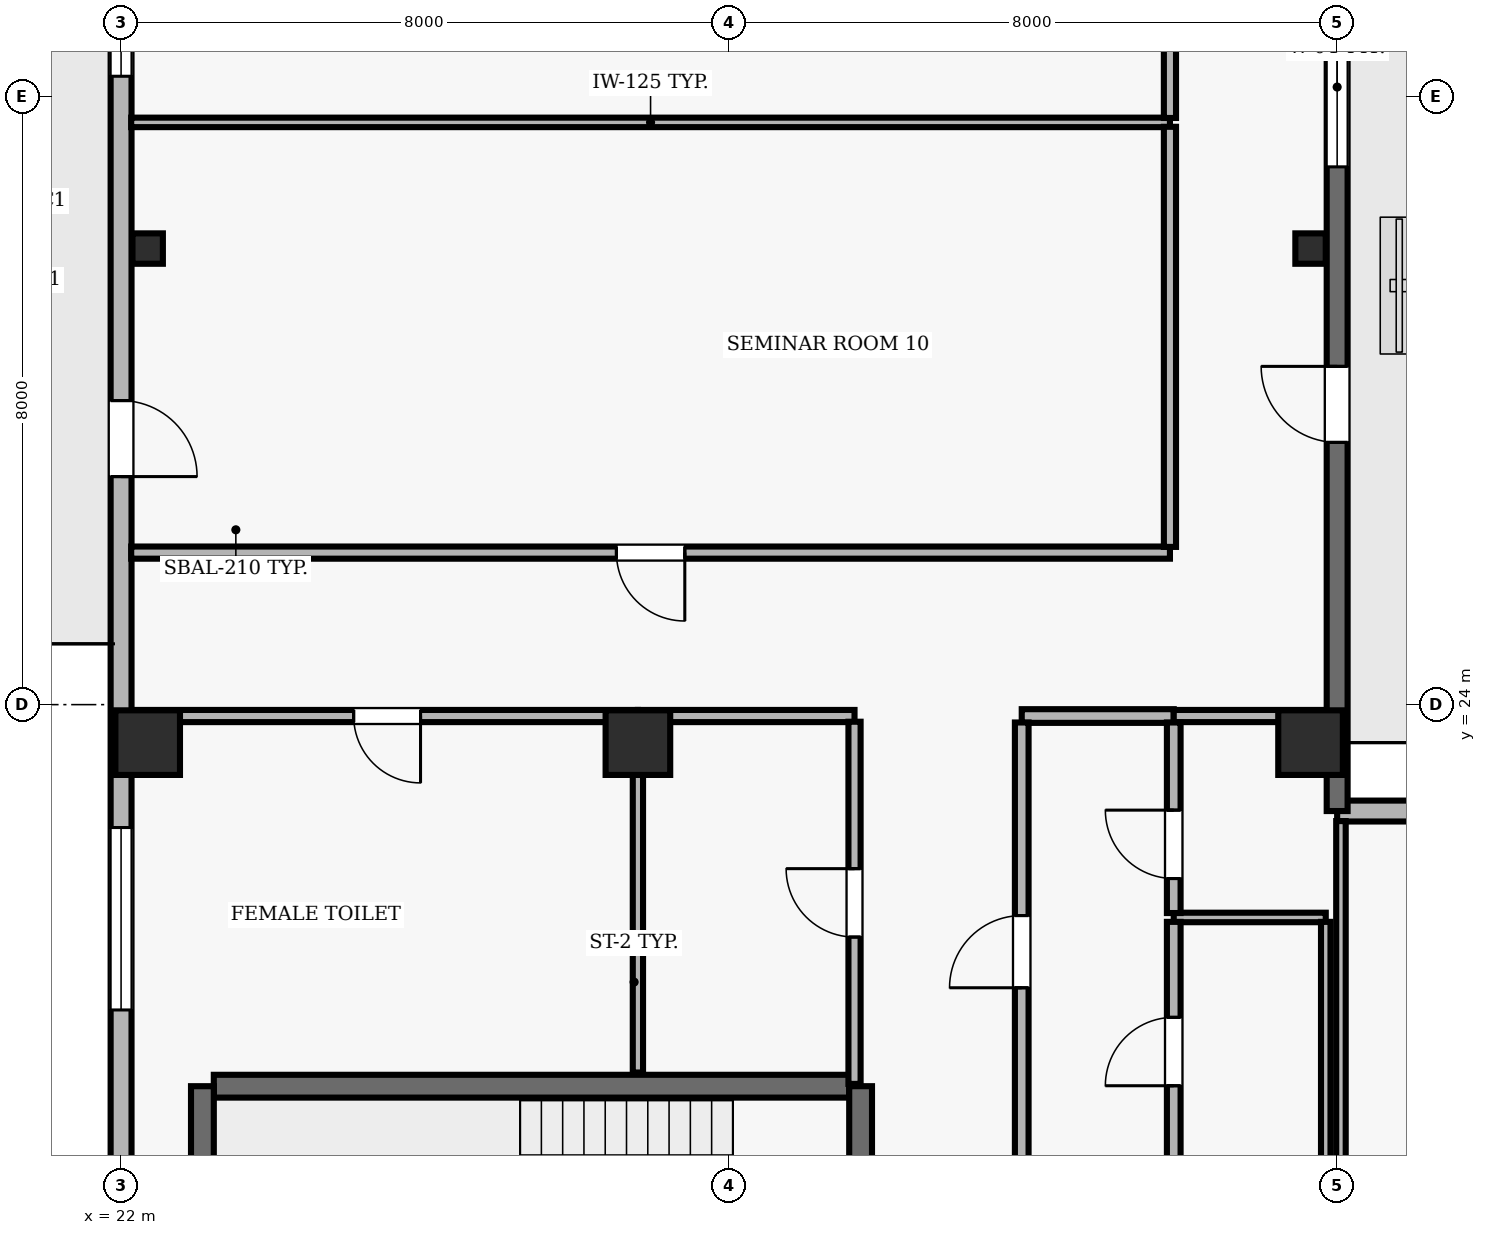
"""IFC4 building model, lengths in metres.
Left out: names, types, materials, properties, quantities, classifications, styles, units other than length and angle.
Written with IfcOpenShell. Run it as: python <this file> out.ifc"""

import sys

from ifc_helpers import new_model, si_unit, direction, frame, frame_2d, origin, origin_2d, place, context, subcontext, project, spatial, rectangle, hollow_rectangle, extrude, element, fill, save


model = new_model("IFC4")
c1 = context("Model", 3, precision=1e-05, world=origin(), true_north=direction((0.0, 1.0)))
c2 = subcontext(c1, "Body", "Model", "MODEL_VIEW")
j1 = project(units=[si_unit("LENGTHUNIT", "METRE"), si_unit("PLANEANGLEUNIT", "RADIAN")], contexts=[c1])
p1 = place(None, origin())
s1 = spatial("IfcSite", under=j1, at=p1, CompositionType="ELEMENT")
p2 = place(p1, origin())
s2 = spatial("IfcBuilding", under=s1, at=p2, CompositionType="ELEMENT")
p3 = place(p2, frame((0.0, 0.0, 275.5)))
s3 = spatial("IfcBuildingStorey", under=s2, at=p3, CompositionType="ELEMENT", Elevation=275.5)
for number, where, z_axis, x_axis in (
    (1, (22.35, 23.5, 0.0), (0.0, 0.0, 1.0), (1.0, 0.0, 0.0)),
    (2, (28.8, 23.5, 0.0), (0.0, 0.0, 1.0), (1.0, 0.0, 0.0)),
    (3, (37.65, 23.5, 0.0), (0.0, 0.0, 1.0), (1.0, 0.0, 0.0)),
):
    element("IfcColumn", number, at=place(p3, frame(where, z_axis=z_axis, x_axis=x_axis)), inside=s3, PredefinedType="COLUMN", context=c2, shape_type="SweptSolid", body=[
        extrude(rectangle(XDim=0.85, YDim=0.85, at=origin_2d()), origin(), (0.0, 0.0, 1.0), 3.9),
    ])
for number, where, z_axis, x_axis in (
    (4, (22.35, 30.0, 0.0), (0.0, 0.0, 1.0), (1.0, 0.0, 0.0)),
    (5, (37.65, 30.0, 0.0), (0.0, 0.0, 1.0), (1.0, 0.0, 0.0)),
):
    element("IfcColumn", number, at=place(p3, frame(where, z_axis=z_axis, x_axis=x_axis)), inside=s3, PredefinedType="COLUMN", context=c2, shape_type="SweptSolid", body=[
        extrude(hollow_rectangle(XDim=0.4, YDim=0.4, WallThickness=0.02, at=origin_2d()), origin(), (0.0, 0.0, 1.0), 3.9),
    ])
p4 = place(p3, frame((43.0, 22.6, 0.0), z_axis=(0.0, 0.0, 1.0), x_axis=(-1.0, 0.0, 0.0)))
e6 = element("IfcWall", 6, at=p4, inside=s3, PredefinedType="SOLIDWALL", context=c2, shape_type="SweptSolid", body=[
    extrude(rectangle(XDim=5.0, YDim=0.275, at=frame_2d((2.5, 0.0))), origin(), (0.0, 0.0, 1.0), 3.69),
])
p5 = place(p3, frame((38.0, 22.6, 0.0), z_axis=(0.0, 0.0, 1.0), x_axis=(0.0, 1.0, 0.0)))
e7 = element("IfcWall", 7, at=p5, inside=s3, PredefinedType="SOLIDWALL", context=c2, shape_type="SweptSolid", body=[
    extrude(rectangle(XDim=12.7, YDim=0.275, at=frame_2d((6.35, 0.0))), origin(), (0.0, 0.0, 1.0), 3.69),
])
p6 = place(p5, frame((4.85, 0.0, 0.0)))
e8 = element("IfcOpeningElement", 8, at=p6, cuts=e7, PredefinedType="OPENING", context=c2, shape_type="SweptSolid", body=[
    extrude(rectangle(XDim=1.0, YDim=2.2, at=frame_2d((0.5, 1.1))), frame((0.0, 0.147, 0.0), z_axis=(0.0, -1.0, 0.0), x_axis=(1.0, 0.0, 0.0)), (0.0, 0.0, 1.0), 0.295),
])
p7 = place(p5, frame((8.475, 0.0, 0.9)))
e9 = element("IfcOpeningElement", 9, at=p7, cuts=e7, PredefinedType="OPENING", context=c2, shape_type="SweptSolid", body=[
    extrude(rectangle(XDim=2.1, YDim=1.6, at=frame_2d((1.05, 0.8))), frame((0.0, 0.147, 0.0), z_axis=(0.0, -1.0, 0.0), x_axis=(1.0, 0.0, 0.0)), (0.0, 0.0, 1.0), 0.295),
])
p8 = place(p3, frame((22.0, 35.3, 0.0), z_axis=(0.0, 0.0, 1.0), x_axis=(0.0, -1.0, 0.0)))
e10 = element("IfcWall", 10, at=p8, inside=s3, PredefinedType="SOLIDWALL", context=c2, shape_type="SweptSolid", body=[
    extrude(rectangle(XDim=32.8, YDim=0.275, at=frame_2d((16.4, 0.0))), origin(), (0.0, 0.0, 1.0), 3.69),
])
p9 = place(p8, frame((7.3, 0.0, 0.0)))
e11 = element("IfcOpeningElement", 11, at=p9, cuts=e10, PredefinedType="OPENING", context=c2, shape_type="SweptSolid", body=[
    extrude(rectangle(XDim=1.0, YDim=2.2, at=frame_2d((0.5, 1.1))), frame((0.0, 0.147, 0.0), z_axis=(0.0, -1.0, 0.0), x_axis=(1.0, 0.0, 0.0)), (0.0, 0.0, 1.0), 0.295),
])
p10 = place(p8, frame((0.633, 0.0, 0.9)))
e12 = element("IfcOpeningElement", 12, at=p10, cuts=e10, PredefinedType="OPENING", context=c2, shape_type="SweptSolid", body=[
    extrude(rectangle(XDim=2.4, YDim=1.8, at=frame_2d((1.2, 0.9))), frame((0.0, 0.147, 0.0), z_axis=(0.0, -1.0, 0.0), x_axis=(1.0, 0.0, 0.0)), (0.0, 0.0, 1.0), 0.295),
])
p11 = place(p8, frame((12.917, 0.0, 0.9)))
e13 = element("IfcOpeningElement", 13, at=p11, cuts=e10, PredefinedType="OPENING", context=c2, shape_type="SweptSolid", body=[
    extrude(rectangle(XDim=2.4, YDim=1.8, at=frame_2d((1.2, 0.9))), frame((0.0, 0.147, 0.0), z_axis=(0.0, -1.0, 0.0), x_axis=(1.0, 0.0, 0.0)), (0.0, 0.0, 1.0), 0.295),
])
p12 = place(p8, frame((17.483, 0.0, 0.9)))
e14 = element("IfcOpeningElement", 14, at=p12, cuts=e10, PredefinedType="OPENING", context=c2, shape_type="SweptSolid", body=[
    extrude(rectangle(XDim=2.4, YDim=1.8, at=frame_2d((1.2, 0.9))), frame((0.0, 0.147, 0.0), z_axis=(0.0, -1.0, 0.0), x_axis=(1.0, 0.0, 0.0)), (0.0, 0.0, 1.0), 0.295),
])
p13 = place(p8, frame((23.4, 0.0, 0.9)))
e15 = element("IfcOpeningElement", 15, at=p13, cuts=e10, PredefinedType="OPENING", context=c2, shape_type="SweptSolid", body=[
    extrude(rectangle(XDim=2.4, YDim=1.8, at=frame_2d((1.2, 0.9))), frame((0.0, 0.147, 0.0), z_axis=(0.0, -1.0, 0.0), x_axis=(1.0, 0.0, 0.0)), (0.0, 0.0, 1.0), 0.295),
])
p14 = place(p3, frame((31.58, 18.98, 0.0), z_axis=(0.0, 0.0, 1.0), x_axis=(-1.0, 0.0, 0.0)))
e16 = element("IfcWall", 16, at=p14, inside=s3, PredefinedType="SHEAR", context=c2, shape_type="SweptSolid", body=[
    extrude(rectangle(XDim=8.36, YDim=0.3, at=frame_2d((4.18, 0.0))), origin(), (0.0, 0.0, 1.0), 3.69),
])
p15 = place(p3, frame((23.07, 18.98, 0.0), z_axis=(0.0, 0.0, 1.0), x_axis=(0.0, -1.0, 0.0)))
e17 = element("IfcWall", 17, at=p15, inside=s3, PredefinedType="SHEAR", context=c2, shape_type="SweptSolid", body=[
    extrude(rectangle(XDim=3.51, YDim=0.3, at=frame_2d((1.755, 0.0))), origin(), (0.0, 0.0, 1.0), 3.69),
])
p16 = place(p3, frame((31.73, 15.47, 0.0), z_axis=(0.0, 0.0, 1.0), x_axis=(0.0, 1.0, 0.0)))
e18 = element("IfcWall", 18, at=p16, inside=s3, PredefinedType="SHEAR", context=c2, shape_type="SweptSolid", body=[
    extrude(rectangle(XDim=3.51, YDim=0.3, at=frame_2d((1.755, 0.0))), origin(), (0.0, 0.0, 1.0), 3.69),
])
p17 = place(p16, frame((1.18, 0.0, 0.0)))
e19 = element("IfcOpeningElement", 19, at=p17, cuts=e18, PredefinedType="OPENING", context=c2, shape_type="SweptSolid", body=[
    extrude(rectangle(XDim=1.15, YDim=2.15, at=frame_2d((0.575, 1.075))), frame((0.0, 0.16, 0.0), z_axis=(0.0, -1.0, 0.0), x_axis=(1.0, 0.0, 0.0)), (0.0, 0.0, 1.0), 0.32),
])
p18 = place(p3, frame((28.8, 23.85, 0.0), z_axis=(0.0, 0.0, 1.0), x_axis=(-1.0, 0.0, 0.0)))
e20 = element("IfcWall", 20, at=p18, inside=s3, PredefinedType="PARTITIONING", context=c2, shape_type="SweptSolid", body=[
    extrude(rectangle(XDim=6.6, YDim=0.16, at=frame_2d((3.3, 0.0))), origin(), (0.0, 0.0, 1.0), 3.227),
])
p19 = place(p18, frame((2.86, 0.0, 0.0)))
e21 = element("IfcOpeningElement", 21, at=p19, cuts=e20, PredefinedType="OPENING", context=c2, shape_type="SweptSolid", body=[
    extrude(rectangle(XDim=0.88, YDim=2.1, at=frame_2d((0.44, 1.05))), frame((0.0, 0.09, 0.0), z_axis=(0.0, -1.0, 0.0), x_axis=(1.0, 0.0, 0.0)), (0.0, 0.0, 1.0), 0.18),
])
p20 = place(p3, frame((31.65, 23.85, 0.0), z_axis=(0.0, 0.0, 1.0), x_axis=(-1.0, 0.0, 0.0)))
e22 = element("IfcWall", 22, at=p20, inside=s3, PredefinedType="PARTITIONING", context=c2, shape_type="SweptSolid", body=[
    extrude(rectangle(XDim=2.85, YDim=0.16, at=frame_2d((1.425, 0.0))), origin(), (0.0, 0.0, 1.0), 3.227),
])
p21 = place(p3, frame((35.8, 26.0, 0.0), z_axis=(0.0, 0.0, 1.0), x_axis=(-1.0, 0.0, 0.0)))
e23 = element("IfcWall", 23, at=p21, inside=s3, PredefinedType="PARTITIONING", context=c2, shape_type="SweptSolid", body=[
    extrude(rectangle(XDim=13.667, YDim=0.16, at=frame_2d((6.833, 0.0))), origin(), (0.0, 0.0, 1.0), 3.69),
])
p22 = place(p21, frame((6.383, 0.0, 0.0)))
e24 = element("IfcOpeningElement", 24, at=p22, cuts=e23, PredefinedType="OPENING", context=c2, shape_type="SweptSolid", body=[
    extrude(rectangle(XDim=0.9, YDim=2.1, at=frame_2d((0.45, 1.05))), frame((0.0, 0.09, 0.0), z_axis=(0.0, -1.0, 0.0), x_axis=(1.0, 0.0, 0.0)), (0.0, 0.0, 1.0), 0.18),
])
p23 = place(p3, frame((35.8, 31.66, 0.0), z_axis=(0.0, 0.0, 1.0), x_axis=(-1.0, 0.0, 0.0)))
e25 = element("IfcWall", 25, at=p23, inside=s3, PredefinedType="PARTITIONING", context=c2, shape_type="SweptSolid", body=[
    extrude(rectangle(XDim=13.667, YDim=0.125, at=frame_2d((6.833, 0.0))), origin(), (0.0, 0.0, 1.0), 3.69),
])
p24 = place(p3, frame((35.85, 21.2, 0.0), z_axis=(0.0, 0.0, 1.0), x_axis=(1.0, 0.0, 0.0)))
e26 = element("IfcWall", 26, at=p24, inside=s3, PredefinedType="PARTITIONING", context=c2, shape_type="SweptSolid", body=[
    extrude(rectangle(XDim=2.0, YDim=0.125, at=frame_2d((1.0, 0.0))), origin(), (0.0, 0.0, 1.0), 3.69),
])
p25 = place(p3, frame((35.85, 23.85, 0.0), z_axis=(0.0, 0.0, 1.0), x_axis=(-1.0, 0.0, 0.0)))
e27 = element("IfcWall", 27, at=p25, inside=s3, PredefinedType="PARTITIONING", context=c2, shape_type="SweptSolid", body=[
    extrude(rectangle(XDim=2.0, YDim=0.18, at=frame_2d((1.0, 0.0))), origin(), (0.0, 0.0, 1.0), 3.227),
])
p26 = place(p3, frame((37.85, 23.85, 0.0), z_axis=(0.0, 0.0, 1.0), x_axis=(-1.0, 0.0, 0.0)))
e28 = element("IfcWall", 28, at=p26, inside=s3, PredefinedType="PARTITIONING", context=c2, shape_type="SweptSolid", body=[
    extrude(rectangle(XDim=2.0, YDim=0.16, at=frame_2d((1.0, 0.0))), origin(), (0.0, 0.0, 1.0), 3.227),
])
p27 = place(p3, frame((28.8, 23.775, 0.0), z_axis=(0.0, 0.0, 1.0), x_axis=(0.0, -1.0, 0.0)))
e29 = element("IfcWall", 29, at=p27, inside=s3, PredefinedType="PARTITIONING", context=c2, shape_type="SweptSolid", body=[
    extrude(rectangle(XDim=4.615, YDim=0.135, at=frame_2d((2.308, 0.0))), origin(), (0.0, 0.0, 1.0), 3.69),
])
p28 = place(p3, frame((31.65, 19.01, 0.0), z_axis=(0.0, 0.0, 1.0), x_axis=(0.0, 1.0, 0.0)))
e30 = element("IfcWall", 30, at=p28, inside=s3, PredefinedType="PARTITIONING", context=c2, shape_type="SweptSolid", body=[
    extrude(rectangle(XDim=4.765, YDim=0.16, at=frame_2d((2.382, 0.0))), origin(), (0.0, 0.0, 1.0), 3.69),
])
p29 = place(p28, frame((1.932, 0.0, 0.0)))
e31 = element("IfcOpeningElement", 31, at=p29, cuts=e30, PredefinedType="OPENING", context=c2, shape_type="SweptSolid", body=[
    extrude(rectangle(XDim=0.9, YDim=2.1, at=frame_2d((0.45, 1.05))), frame((0.0, 0.09, 0.0), z_axis=(0.0, -1.0, 0.0), x_axis=(1.0, 0.0, 0.0)), (0.0, 0.0, 1.0), 0.18),
])
p30 = place(p3, frame((33.85, 17.735, 0.0), z_axis=(0.0, 0.0, 1.0), x_axis=(0.0, 1.0, 0.0)))
e32 = element("IfcWall", 32, at=p30, inside=s3, PredefinedType="PARTITIONING", context=c2, shape_type="SweptSolid", body=[
    extrude(rectangle(XDim=6.03, YDim=0.18, at=frame_2d((3.015, 0.0))), origin(), (0.0, 0.0, 1.0), 3.69),
])
p31 = place(p30, frame((2.54, 0.0, 0.0)))
e33 = element("IfcOpeningElement", 33, at=p31, cuts=e32, PredefinedType="OPENING", context=c2, shape_type="SweptSolid", body=[
    extrude(rectangle(XDim=0.95, YDim=2.1, at=frame_2d((0.475, 1.05))), frame((0.0, 0.1, 0.0), z_axis=(0.0, -1.0, 0.0), x_axis=(1.0, 0.0, 0.0)), (0.0, 0.0, 1.0), 0.2),
])
p32 = place(p3, frame((35.8, 31.602, 0.0), z_axis=(0.0, 0.0, 1.0), x_axis=(0.0, -1.0, 0.0)))
e34 = element("IfcWall", 34, at=p32, inside=s3, PredefinedType="PARTITIONING", context=c2, shape_type="SweptSolid", body=[
    extrude(rectangle(XDim=5.527, YDim=0.16, at=frame_2d((2.764, 0.0))), origin(), (0.0, 0.0, 1.0), 3.69),
])
p33 = place(p3, frame((35.8, 37.313, 0.0), z_axis=(0.0, 0.0, 1.0), x_axis=(0.0, -1.0, 0.0)))
e35 = element("IfcWall", 35, at=p33, inside=s3, PredefinedType="PARTITIONING", context=c2, shape_type="SweptSolid", body=[
    extrude(rectangle(XDim=5.595, YDim=0.16, at=frame_2d((2.797, 0.0))), origin(), (0.0, 0.0, 1.0), 3.69),
])
p34 = place(p33, frame((2.348, 0.0, 0.0)))
e36 = element("IfcOpeningElement", 36, at=p34, cuts=e35, PredefinedType="OPENING", context=c2, shape_type="SweptSolid", body=[
    extrude(rectangle(XDim=0.9, YDim=2.1, at=frame_2d((0.45, 1.05))), frame((0.0, 0.09, 0.0), z_axis=(0.0, -1.0, 0.0), x_axis=(1.0, 0.0, 0.0)), (0.0, 0.0, 1.0), 0.18),
])
p35 = place(p3, frame((35.85, 17.73, 0.0), z_axis=(0.0, 0.0, 1.0), x_axis=(0.0, 1.0, 0.0)))
e37 = element("IfcWall", 37, at=p35, inside=s3, PredefinedType="PARTITIONING", context=c2, shape_type="SweptSolid", body=[
    extrude(rectangle(XDim=3.412, YDim=0.18, at=frame_2d((1.706, 0.0))), origin(), (0.0, 0.0, 1.0), 3.69),
])
p36 = place(p35, frame((1.256, 0.0, 0.0)))
e38 = element("IfcOpeningElement", 38, at=p36, cuts=e37, PredefinedType="OPENING", context=c2, shape_type="SweptSolid", body=[
    extrude(rectangle(XDim=0.9, YDim=2.1, at=frame_2d((0.45, 1.05))), frame((0.0, 0.1, 0.0), z_axis=(0.0, -1.0, 0.0), x_axis=(1.0, 0.0, 0.0)), (0.0, 0.0, 1.0), 0.2),
])
p37 = place(p3, frame((35.85, 21.258, 0.0), z_axis=(0.0, 0.0, 1.0), x_axis=(0.0, 1.0, 0.0)))
e39 = element("IfcWall", 39, at=p37, inside=s3, PredefinedType="PARTITIONING", context=c2, shape_type="SweptSolid", body=[
    extrude(rectangle(XDim=2.507, YDim=0.18, at=frame_2d((1.253, 0.0))), origin(), (0.0, 0.0, 1.0), 3.69),
])
p38 = place(p37, frame((0.454, 0.0, 0.0)))
e40 = element("IfcOpeningElement", 40, at=p38, cuts=e39, PredefinedType="OPENING", context=c2, shape_type="SweptSolid", body=[
    extrude(rectangle(XDim=0.9, YDim=2.1, at=frame_2d((0.45, 1.05))), frame((0.0, 0.1, 0.0), z_axis=(0.0, -1.0, 0.0), x_axis=(1.0, 0.0, 0.0)), (0.0, 0.0, 1.0), 0.2),
])
p39 = place(p3, frame((37.85, 17.65, 0.0), z_axis=(0.0, 0.0, 1.0), x_axis=(0.0, 1.0, 0.0)))
e41 = element("IfcWall", 41, at=p39, inside=s3, PredefinedType="PARTITIONING", context=c2, shape_type="SweptSolid", body=[
    extrude(rectangle(XDim=3.492, YDim=0.125, at=frame_2d((1.746, 0.0))), origin(), (0.0, 0.0, 1.0), 3.227),
])
p40 = place(p3, frame((38.05, 22.468, 0.0), z_axis=(0.0, 0.0, 1.0), x_axis=(0.0, -1.0, 0.0)))
e42 = element("IfcWall", 42, at=p40, inside=s3, PredefinedType="PARTITIONING", context=c2, shape_type="SweptSolid", body=[
    extrude(rectangle(XDim=6.393, YDim=0.125, at=frame_2d((3.197, 0.0))), origin(), (0.0, 0.0, 1.0), 3.227),
])
p41 = place(p6, origin())
e43 = element("IfcDoor", 43, at=p41, inside=s3, OperationType="SINGLE_SWING_RIGHT", PredefinedType="DOOR", context=c2, shape_type="SweptSolid", body=[
    extrude(rectangle(XDim=1.0, YDim=2.2, at=frame_2d((0.5, 1.1))), frame((0.0, 0.025, 0.0), z_axis=(0.0, -1.0, 0.0), x_axis=(1.0, 0.0, 0.0)), (0.0, 0.0, 1.0), 0.05),
])
fill(e8, e43)
p42 = place(p7, origin())
e44 = element("IfcWindow", 44, at=p42, inside=s3, PartitioningType="SINGLE_PANEL", PredefinedType="WINDOW", context=c2, shape_type="SweptSolid", body=[
    extrude(rectangle(XDim=2.1, YDim=1.6, at=frame_2d((1.05, 0.8))), frame((0.0, 0.03, 0.0), z_axis=(0.0, -1.0, 0.0), x_axis=(1.0, 0.0, 0.0)), (0.0, 0.0, 1.0), 0.06),
])
fill(e9, e44)
p43 = place(p9, origin())
e45 = element("IfcDoor", 45, at=p43, inside=s3, OperationType="SINGLE_SWING_RIGHT", PredefinedType="DOOR", context=c2, shape_type="SweptSolid", body=[
    extrude(rectangle(XDim=1.0, YDim=2.2, at=frame_2d((0.5, 1.1))), frame((0.0, 0.025, 0.0), z_axis=(0.0, -1.0, 0.0), x_axis=(1.0, 0.0, 0.0)), (0.0, 0.0, 1.0), 0.05),
])
fill(e11, e45)
p44 = place(p10, origin())
e46 = element("IfcWindow", 46, at=p44, inside=s3, PartitioningType="SINGLE_PANEL", PredefinedType="WINDOW", context=c2, shape_type="SweptSolid", body=[
    extrude(rectangle(XDim=2.4, YDim=1.8, at=frame_2d((1.2, 0.9))), frame((0.0, 0.03, 0.0), z_axis=(0.0, -1.0, 0.0), x_axis=(1.0, 0.0, 0.0)), (0.0, 0.0, 1.0), 0.06),
])
fill(e12, e46)
p45 = place(p11, origin())
e47 = element("IfcWindow", 47, at=p45, inside=s3, PartitioningType="SINGLE_PANEL", PredefinedType="WINDOW", context=c2, shape_type="SweptSolid", body=[
    extrude(rectangle(XDim=2.4, YDim=1.8, at=frame_2d((1.2, 0.9))), frame((0.0, 0.03, 0.0), z_axis=(0.0, -1.0, 0.0), x_axis=(1.0, 0.0, 0.0)), (0.0, 0.0, 1.0), 0.06),
])
fill(e13, e47)
p46 = place(p31, origin())
e48 = element("IfcDoor", 48, at=p46, inside=s3, OperationType="SINGLE_SWING_LEFT", PredefinedType="DOOR", context=c2, shape_type="SweptSolid", body=[
    extrude(rectangle(XDim=0.95, YDim=2.1, at=frame_2d((0.475, 1.05))), frame((0.0, 0.025, 0.0), z_axis=(0.0, -1.0, 0.0), x_axis=(1.0, 0.0, 0.0)), (0.0, 0.0, 1.0), 0.05),
])
fill(e33, e48)
p47 = place(p38, origin())
e49 = element("IfcDoor", 49, at=p47, inside=s3, OperationType="SINGLE_SWING_RIGHT", PredefinedType="DOOR", context=c2, shape_type="SweptSolid", body=[
    extrude(rectangle(XDim=0.9, YDim=2.1, at=frame_2d((0.45, 1.05))), frame((0.0, 0.025, 0.0), z_axis=(0.0, -1.0, 0.0), x_axis=(1.0, 0.0, 0.0)), (0.0, 0.0, 1.0), 0.05),
])
fill(e40, e49)
p48 = place(p36, origin())
e50 = element("IfcDoor", 50, at=p48, inside=s3, OperationType="SINGLE_SWING_LEFT", PredefinedType="DOOR", context=c2, shape_type="SweptSolid", body=[
    extrude(rectangle(XDim=0.9, YDim=2.1, at=frame_2d((0.45, 1.05))), frame((0.0, 0.025, 0.0), z_axis=(0.0, -1.0, 0.0), x_axis=(1.0, 0.0, 0.0)), (0.0, 0.0, 1.0), 0.05),
])
fill(e38, e50)
p49 = place(p29, origin())
e51 = element("IfcDoor", 51, at=p49, inside=s3, OperationType="SINGLE_SWING_RIGHT", PredefinedType="DOOR", context=c2, shape_type="SweptSolid", body=[
    extrude(rectangle(XDim=0.9, YDim=2.1, at=frame_2d((0.45, 1.05))), frame((0.0, 0.025, 0.0), z_axis=(0.0, -1.0, 0.0), x_axis=(1.0, 0.0, 0.0)), (0.0, 0.0, 1.0), 0.05),
])
fill(e31, e51)
p50 = place(p19, origin())
e52 = element("IfcDoor", 52, at=p50, inside=s3, OperationType="SINGLE_SWING_LEFT", PredefinedType="DOOR", context=c2, shape_type="SweptSolid", body=[
    extrude(rectangle(XDim=0.88, YDim=2.1, at=frame_2d((0.44, 1.05))), frame((0.0, 0.025, 0.0), z_axis=(0.0, -1.0, 0.0), x_axis=(1.0, 0.0, 0.0)), (0.0, 0.0, 1.0), 0.05),
])
fill(e21, e52)
p51 = place(p22, origin())
e53 = element("IfcDoor", 53, at=p51, inside=s3, OperationType="SINGLE_SWING_LEFT", PredefinedType="DOOR", context=c2, shape_type="SweptSolid", body=[
    extrude(rectangle(XDim=0.9, YDim=2.1, at=frame_2d((0.45, 1.05))), frame((0.0, 0.025, 0.0), z_axis=(0.0, -1.0, 0.0), x_axis=(1.0, 0.0, 0.0)), (0.0, 0.0, 1.0), 0.05),
])
fill(e24, e53)
save(model, sys.argv[1])
